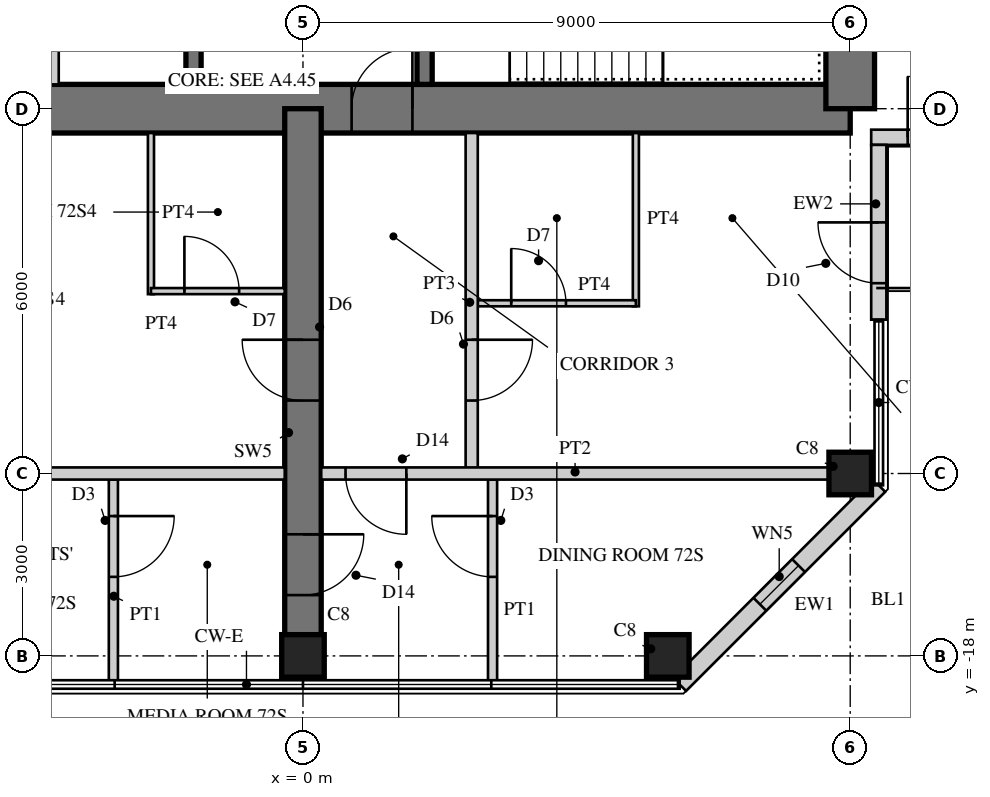
"""IFC4 building model, lengths in metres.
Left out: names, types, materials, properties, quantities, classifications, styles, units other than length and angle.
Written with IfcOpenShell. Run it as: python <this file> out.ifc"""

import sys

from ifc_helpers import new_model, si_unit, direction, frame, frame_2d, origin, origin_2d, place, context, subcontext, project, spatial, rectangle, hollow_rectangle, extrude, element, fill, save


model = new_model("IFC4")
c1 = context("Model", 3, precision=1e-05, world=origin(), true_north=direction((0.0, 1.0)))
c2 = subcontext(c1, "Body", "Model", "MODEL_VIEW")
j1 = project(units=[si_unit("LENGTHUNIT", "METRE"), si_unit("PLANEANGLEUNIT", "RADIAN")], contexts=[c1])
p1 = place(None, origin())
s1 = spatial("IfcSite", under=j1, at=p1, CompositionType="ELEMENT")
p2 = place(p1, origin())
s2 = spatial("IfcBuilding", under=s1, at=p2, CompositionType="ELEMENT")
p3 = place(p2, frame((0.0, 0.0, 278.1)))
s3 = spatial("IfcBuildingStorey", under=s2, at=p3, CompositionType="ELEMENT", Elevation=278.1)
p4 = place(p3, frame((-9.0, -9.0, 0.0), z_axis=(0.0, 0.0, 1.0), x_axis=(1.0, 0.0, 0.0)))
e1 = element("IfcWall", 1, at=p4, inside=s3, PredefinedType="SHEAR", context=c2, shape_type="SweptSolid", body=[
    extrude(rectangle(XDim=18.0, YDim=0.8, at=frame_2d((9.0, 0.0))), origin(), (0.0, 0.0, 1.0), 3.4),
])
p5 = place(p4, frame((9.8, 0.0, 0.0)))
e2 = element("IfcOpeningElement", 2, at=p5, cuts=e1, PredefinedType="OPENING", context=c2, shape_type="SweptSolid", body=[
    extrude(rectangle(XDim=1.0, YDim=2.4, at=frame_2d((0.5, 1.2))), frame((0.0, 0.41, 0.0), z_axis=(0.0, -1.0, 0.0), x_axis=(1.0, 0.0, 0.0)), (0.0, 0.0, 1.0), 0.82),
])
p6 = place(p3, frame((9.0, -9.0, 0.0), z_axis=(0.0, 0.0, 1.0), x_axis=(0.0, 1.0, 0.0)))
e3 = element("IfcWall", 3, at=p6, inside=s3, PredefinedType="SHEAR", context=c2, shape_type="SweptSolid", body=[
    extrude(rectangle(XDim=18.0, YDim=0.8, at=frame_2d((9.0, 0.0))), origin(), (0.0, 0.0, 1.0), 3.4),
])
p7 = place(p6, frame((9.8, 0.0, 0.0)))
e4 = element("IfcOpeningElement", 4, at=p7, cuts=e3, PredefinedType="OPENING", context=c2, shape_type="SweptSolid", body=[
    extrude(rectangle(XDim=1.0, YDim=2.4, at=frame_2d((0.5, 1.2))), frame((0.0, 0.41, 0.0), z_axis=(0.0, -1.0, 0.0), x_axis=(1.0, 0.0, 0.0)), (0.0, 0.0, 1.0), 0.82),
])
p8 = place(p3, frame((-1.8, -1.875, 0.0), z_axis=(0.0, 0.0, 1.0), x_axis=(0.0, -1.0, 0.0)))
e5 = element("IfcWall", 5, at=p8, inside=s3, PredefinedType="SHEAR", context=c2, shape_type="SweptSolid", body=[
    extrude(rectangle(XDim=6.725, YDim=0.25, at=frame_2d((3.363, 0.0))), origin(), (0.0, 0.0, 1.0), 3.4),
])
p9 = place(p8, frame((1.875, 0.0, 0.0)))
e6 = element("IfcOpeningElement", 6, at=p9, cuts=e5, PredefinedType="OPENING", context=c2, shape_type="SweptSolid", body=[
    extrude(rectangle(XDim=1.6, YDim=2.4, at=frame_2d((0.8, 1.2))), frame((0.0, 0.135, 0.0), z_axis=(0.0, -1.0, 0.0), x_axis=(1.0, 0.0, 0.0)), (0.0, 0.0, 1.0), 0.27),
])
p10 = place(p3, frame((-4.117, -5.975, 0.0), z_axis=(0.0, 0.0, 1.0), x_axis=(0.0, -1.0, 0.0)))
e7 = element("IfcWall", 7, at=p10, inside=s3, PredefinedType="PARTITIONING", context=c2, shape_type="SweptSolid", body=[
    extrude(rectangle(XDim=2.625, YDim=0.2, at=frame_2d((1.312, 0.0))), origin(), (0.0, 0.0, 1.0), 3.4),
])
p11 = place(p3, frame((2.0, -1.675, 0.0), z_axis=(0.0, 0.0, 1.0), x_axis=(0.0, -1.0, 0.0)))
e8 = element("IfcWall", 8, at=p11, inside=s3, PredefinedType="SHEAR", context=c2, shape_type="SweptSolid", body=[
    extrude(rectangle(XDim=6.925, YDim=0.25, at=frame_2d((3.462, 0.0))), origin(), (0.0, 0.0, 1.0), 3.4),
])
p12 = place(p11, frame((0.725, 0.0, 0.0)))
e9 = element("IfcOpeningElement", 9, at=p12, cuts=e8, PredefinedType="OPENING", context=c2, shape_type="SweptSolid", body=[
    extrude(rectangle(XDim=1.0, YDim=2.1, at=frame_2d((0.5, 1.05))), frame((0.0, 0.135, 0.0), z_axis=(0.0, -1.0, 0.0), x_axis=(1.0, 0.0, 0.0)), (0.0, 0.0, 1.0), 0.27),
])
p13 = place(p3, frame((0.0, -9.0, 0.0), z_axis=(0.0, 0.0, 1.0), x_axis=(0.0, -1.0, 0.0)))
e10 = element("IfcWall", 10, at=p13, inside=s3, PredefinedType="SHEAR", context=c2, shape_type="SweptSolid", body=[
    extrude(rectangle(XDim=9.0, YDim=0.6, at=frame_2d((4.5, 0.0))), origin(), (0.0, 0.0, 1.0), 3.4),
])
p14 = place(p13, frame((3.8, 0.0, 0.0)))
e11 = element("IfcOpeningElement", 11, at=p14, cuts=e10, PredefinedType="OPENING", context=c2, shape_type="SweptSolid", body=[
    extrude(rectangle(XDim=1.0, YDim=2.15, at=frame_2d((0.5, 1.075))), frame((0.0, 0.31, 0.0), z_axis=(0.0, -1.0, 0.0), x_axis=(1.0, 0.0, 0.0)), (0.0, 0.0, 1.0), 0.62),
])
p15 = place(p13, frame((7.0, 0.0, 0.0)))
e12 = element("IfcOpeningElement", 12, at=p15, cuts=e10, PredefinedType="OPENING", context=c2, shape_type="SweptSolid", body=[
    extrude(rectangle(XDim=1.0, YDim=2.2, at=frame_2d((0.5, 1.1))), frame((0.0, 0.31, 0.0), z_axis=(0.0, -1.0, 0.0), x_axis=(1.0, 0.0, 0.0)), (0.0, 0.0, 1.0), 0.62),
])
for number, where, z_axis, x_axis in (
    (13, (9.0, -15.0, 0.0), (0.0, 0.0, 1.0), (1.0, 0.0, 0.0)),
    (14, (0.0, -18.0, 0.0), (0.0, 0.0, 1.0), (1.0, 0.0, 0.0)),
    (15, (6.0, -18.0, 0.0), (0.0, 0.0, 1.0), (1.0, 0.0, 0.0)),
):
    element("IfcColumn", number, at=place(p3, frame(where, z_axis=z_axis, x_axis=x_axis)), inside=s3, PredefinedType="COLUMN", context=c2, shape_type="SweptSolid", body=[
        extrude(rectangle(XDim=0.7, YDim=0.7, at=origin_2d()), origin(), (0.0, 0.0, 1.0), 3.4),
    ])
p16 = place(p3, frame((9.345, -9.47, 0.0), z_axis=(0.0, 0.0, 1.0), x_axis=(1.0, 0.0, 0.0)))
e16 = element("IfcWall", 16, at=p16, inside=s3, PredefinedType="SOLIDWALL", context=c2, shape_type="SweptSolid", body=[
    extrude(rectangle(XDim=3.125, YDim=0.25, at=frame_2d((1.562, 0.0))), origin(), (0.0, 0.0, 1.0), 3.22),
])
p17 = place(p16, frame((0.6, 0.0, 0.0)))
e17 = element("IfcOpeningElement", 17, at=p17, cuts=e16, PredefinedType="OPENING", context=c2, shape_type="SweptSolid", body=[
    extrude(rectangle(XDim=1.0, YDim=2.2, at=frame_2d((0.5, 1.1))), frame((0.0, 0.135, 0.0), z_axis=(0.0, -1.0, 0.0), x_axis=(1.0, 0.0, 0.0)), (0.0, 0.0, 1.0), 0.27),
])
p18 = place(p3, frame((6.195, -18.47, 0.0), z_axis=(0.0, 0.0, 1.0), x_axis=(0.707106781187, 0.707106781187, 0.0)))
e18 = element("IfcWall", 18, at=p18, inside=s3, PredefinedType="SOLIDWALL", context=c2, shape_type="SweptSolid", body=[
    extrude(rectangle(XDim=4.632, YDim=0.3, at=frame_2d((2.316, 0.0))), origin(), (0.0, 0.0, 1.0), 3.22),
])
p19 = place(p18, frame((1.866, 0.0, 0.3)))
e19 = element("IfcOpeningElement", 19, at=p19, cuts=e18, PredefinedType="OPENING", context=c2, shape_type="SweptSolid", body=[
    extrude(rectangle(XDim=0.9, YDim=2.4, at=frame_2d((0.45, 1.2))), frame((0.0, 0.16, 0.0), z_axis=(0.0, -1.0, 0.0), x_axis=(1.0, 0.0, 0.0)), (0.0, 0.0, 1.0), 0.32),
])
p20 = place(p3, frame((9.47, -12.47, 0.0), z_axis=(0.0, 0.0, 1.0), x_axis=(0.0, 1.0, 0.0)))
e20 = element("IfcWall", 20, at=p20, inside=s3, PredefinedType="SOLIDWALL", context=c2, shape_type="SweptSolid", body=[
    extrude(rectangle(XDim=2.875, YDim=0.25, at=frame_2d((1.438, 0.0))), origin(), (0.0, 0.0, 1.0), 3.22),
])
p21 = place(p20, frame((0.6, 0.0, 0.0)))
e21 = element("IfcOpeningElement", 21, at=p21, cuts=e20, PredefinedType="OPENING", context=c2, shape_type="SweptSolid", body=[
    extrude(rectangle(XDim=1.0, YDim=2.2, at=frame_2d((0.5, 1.1))), frame((0.0, 0.135, 0.0), z_axis=(0.0, -1.0, 0.0), x_axis=(1.0, 0.0, 0.0)), (0.0, 0.0, 1.0), 0.27),
])
p22 = place(p3, frame((5.475, -9.4, 0.0), z_axis=(0.0, 0.0, 1.0), x_axis=(0.0, -1.0, 0.0)))
e22 = element("IfcWall", 22, at=p22, inside=s3, PredefinedType="PARTITIONING", context=c2, shape_type="SweptSolid", body=[
    extrude(rectangle(XDim=2.85, YDim=0.1, at=frame_2d((1.425, 0.0))), origin(), (0.0, 0.0, 1.0), 3.22),
])
p23 = place(p3, frame((2.875, -12.2, 0.0), z_axis=(0.0, 0.0, 1.0), x_axis=(1.0, 0.0, 0.0)))
e23 = element("IfcWall", 23, at=p23, inside=s3, PredefinedType="PARTITIONING", context=c2, shape_type="SweptSolid", body=[
    extrude(rectangle(XDim=2.6, YDim=0.1, at=frame_2d((1.3, 0.0))), origin(), (0.0, 0.0, 1.0), 3.22),
])
p24 = place(p23, frame((0.55, 0.0, 0.0)))
e24 = element("IfcOpeningElement", 24, at=p24, cuts=e23, PredefinedType="OPENING", context=c2, shape_type="SweptSolid", body=[
    extrude(rectangle(XDim=0.9, YDim=2.1, at=frame_2d((0.45, 1.05))), frame((0.0, 0.06, 0.0), z_axis=(0.0, -1.0, 0.0), x_axis=(1.0, 0.0, 0.0)), (0.0, 0.0, 1.0), 0.12),
])
p25 = place(p3, frame((-2.5, -9.4, 0.0), z_axis=(0.0, 0.0, 1.0), x_axis=(0.0, -1.0, 0.0)))
e25 = element("IfcWall", 25, at=p25, inside=s3, PredefinedType="PARTITIONING", context=c2, shape_type="SweptSolid", body=[
    extrude(rectangle(XDim=2.65, YDim=0.1, at=frame_2d((1.325, 0.0))), origin(), (0.0, 0.0, 1.0), 3.22),
])
p26 = place(p3, frame((-2.5, -12.0, 0.0), z_axis=(0.0, 0.0, 1.0), x_axis=(1.0, 0.0, 0.0)))
e26 = element("IfcWall", 26, at=p26, inside=s3, PredefinedType="PARTITIONING", context=c2, shape_type="SweptSolid", body=[
    extrude(rectangle(XDim=2.2, YDim=0.1, at=frame_2d((1.1, 0.0))), origin(), (0.0, 0.0, 1.0), 3.22),
])
p27 = place(p26, frame((0.55, 0.0, 0.0)))
e27 = element("IfcOpeningElement", 27, at=p27, cuts=e26, PredefinedType="OPENING", context=c2, shape_type="SweptSolid", body=[
    extrude(rectangle(XDim=0.9, YDim=2.1, at=frame_2d((0.45, 1.05))), frame((0.0, 0.06, 0.0), z_axis=(0.0, -1.0, 0.0), x_axis=(1.0, 0.0, 0.0)), (0.0, 0.0, 1.0), 0.12),
])
p28 = place(p3, frame((2.775, -9.4, 0.0), z_axis=(0.0, 0.0, 1.0), x_axis=(0.0, -1.0, 0.0)))
e28 = element("IfcWall", 28, at=p28, inside=s3, PredefinedType="SOLIDWALL", context=c2, shape_type="SweptSolid", body=[
    extrude(rectangle(XDim=5.6, YDim=0.2, at=frame_2d((2.8, 0.0))), origin(), (0.0, 0.0, 1.0), 3.22),
])
p29 = place(p28, frame((3.4, 0.0, 0.0)))
e29 = element("IfcOpeningElement", 29, at=p29, cuts=e28, PredefinedType="OPENING", context=c2, shape_type="SweptSolid", body=[
    extrude(rectangle(XDim=1.0, YDim=2.15, at=frame_2d((0.5, 1.075))), frame((0.0, 0.11, 0.0), z_axis=(0.0, -1.0, 0.0), x_axis=(1.0, 0.0, 0.0)), (0.0, 0.0, 1.0), 0.22),
])
p30 = place(p3, frame((3.118, -15.1, 0.0), z_axis=(0.0, 0.0, 1.0), x_axis=(0.0, -1.0, 0.0)))
e30 = element("IfcWall", 30, at=p30, inside=s3, PredefinedType="PARTITIONING", context=c2, shape_type="SweptSolid", body=[
    extrude(rectangle(XDim=3.33, YDim=0.15, at=frame_2d((1.665, 0.0))), origin(), (0.0, 0.0, 1.0), 3.22),
])
p31 = place(p30, frame((0.6, 0.0, 0.0)))
e31 = element("IfcOpeningElement", 31, at=p31, cuts=e30, PredefinedType="OPENING", context=c2, shape_type="SweptSolid", body=[
    extrude(rectangle(XDim=1.0, YDim=2.1, at=frame_2d((0.5, 1.05))), frame((0.0, 0.085, 0.0), z_axis=(0.0, -1.0, 0.0), x_axis=(1.0, 0.0, 0.0)), (0.0, 0.0, 1.0), 0.17),
])
p32 = place(p3, frame((-3.118, -15.1, 0.0), z_axis=(0.0, 0.0, 1.0), x_axis=(0.0, -1.0, 0.0)))
e32 = element("IfcWall", 32, at=p32, inside=s3, PredefinedType="PARTITIONING", context=c2, shape_type="SweptSolid", body=[
    extrude(rectangle(XDim=3.33, YDim=0.15, at=frame_2d((1.665, 0.0))), origin(), (0.0, 0.0, 1.0), 3.22),
])
p33 = place(p32, frame((0.6, 0.0, 0.0)))
e33 = element("IfcOpeningElement", 33, at=p33, cuts=e32, PredefinedType="OPENING", context=c2, shape_type="SweptSolid", body=[
    extrude(rectangle(XDim=1.0, YDim=2.1, at=frame_2d((0.5, 1.05))), frame((0.0, 0.085, 0.0), z_axis=(0.0, -1.0, 0.0), x_axis=(1.0, 0.0, 0.0)), (0.0, 0.0, 1.0), 0.17),
])
p34 = place(p3, frame((-8.65, -15.0, 0.0), z_axis=(0.0, 0.0, 1.0), x_axis=(1.0, 0.0, 0.0)))
e34 = element("IfcWall", 34, at=p34, inside=s3, PredefinedType="SOLIDWALL", context=c2, shape_type="SweptSolid", body=[
    extrude(rectangle(XDim=8.35, YDim=0.2, at=frame_2d((4.175, 0.0))), origin(), (0.0, 0.0, 1.0), 2.52),
])
p35 = place(p3, frame((0.3, -15.0, 0.0), z_axis=(0.0, 0.0, 1.0), x_axis=(1.0, 0.0, 0.0)))
e35 = element("IfcWall", 35, at=p35, inside=s3, PredefinedType="SOLIDWALL", context=c2, shape_type="SweptSolid", body=[
    extrude(rectangle(XDim=8.35, YDim=0.2, at=frame_2d((4.175, 0.0))), origin(), (0.0, 0.0, 1.0), 2.52),
])
p36 = place(p35, frame((0.4, 0.0, 0.0)))
e36 = element("IfcOpeningElement", 36, at=p36, cuts=e35, PredefinedType="OPENING", context=c2, shape_type="SweptSolid", body=[
    extrude(rectangle(XDim=1.0, YDim=2.2, at=frame_2d((0.5, 1.1))), frame((0.0, 0.11, 0.0), z_axis=(0.0, -1.0, 0.0), x_axis=(1.0, 0.0, 0.0)), (0.0, 0.0, 1.0), 0.22),
])
p37 = place(p17, origin())
e37 = element("IfcDoor", 37, at=p37, inside=s3, OperationType="SINGLE_SWING_LEFT", PredefinedType="DOOR", context=c2, shape_type="SweptSolid", body=[
    extrude(hollow_rectangle(XDim=1.0, YDim=2.2, WallThickness=0.06, at=frame_2d((0.5, 1.1))), frame((0.0, 0.025, 0.0), z_axis=(0.0, -1.0, 0.0), x_axis=(1.0, 0.0, 0.0)), (0.0, 0.0, 1.0), 0.05),
    extrude(rectangle(XDim=0.879, YDim=2.079, at=frame_2d((0.5, 1.1))), frame((0.0, 0.025, 0.0), z_axis=(0.0, -1.0, 0.0), x_axis=(1.0, 0.0, 0.0)), (0.0, 0.0, 1.0), 0.05),
])
fill(e17, e37)
p38 = place(p19, origin())
e38 = element("IfcWindow", 38, at=p38, inside=s3, PartitioningType="SINGLE_PANEL", PredefinedType="WINDOW", context=c2, shape_type="SweptSolid", body=[
    extrude(hollow_rectangle(XDim=0.9, YDim=2.4, WallThickness=0.06, at=frame_2d((0.45, 1.2))), frame((0.0, 0.03, 0.0), z_axis=(0.0, -1.0, 0.0), x_axis=(1.0, 0.0, 0.0)), (0.0, 0.0, 1.0), 0.06),
    extrude(rectangle(XDim=0.779, YDim=2.279, at=frame_2d((0.45, 1.2))), frame((0.0, 0.03, 0.0), z_axis=(0.0, -1.0, 0.0), x_axis=(1.0, 0.0, 0.0)), (0.0, 0.0, 1.0), 0.06),
])
fill(e19, e38)
p39 = place(p21, origin())
e39 = element("IfcDoor", 39, at=p39, inside=s3, OperationType="SINGLE_SWING_RIGHT", PredefinedType="DOOR", context=c2, shape_type="SweptSolid", body=[
    extrude(hollow_rectangle(XDim=1.0, YDim=2.2, WallThickness=0.06, at=frame_2d((0.5, 1.1))), frame((0.0, 0.025, 0.0), z_axis=(0.0, -1.0, 0.0), x_axis=(1.0, 0.0, 0.0)), (0.0, 0.0, 1.0), 0.05),
    extrude(rectangle(XDim=0.879, YDim=2.079, at=frame_2d((0.5, 1.1))), frame((0.0, 0.025, 0.0), z_axis=(0.0, -1.0, 0.0), x_axis=(1.0, 0.0, 0.0)), (0.0, 0.0, 1.0), 0.05),
])
fill(e21, e39)
p40 = place(p24, origin())
e40 = element("IfcDoor", 40, at=p40, inside=s3, OperationType="SINGLE_SWING_LEFT", PredefinedType="DOOR", context=c2, shape_type="SweptSolid", body=[
    extrude(rectangle(XDim=0.9, YDim=2.1, at=frame_2d((0.45, 1.05))), frame((0.0, 0.025, 0.0), z_axis=(0.0, -1.0, 0.0), x_axis=(1.0, 0.0, 0.0)), (0.0, 0.0, 1.0), 0.05),
])
fill(e24, e40)
p41 = place(p27, origin())
e41 = element("IfcDoor", 41, at=p41, inside=s3, OperationType="SINGLE_SWING_LEFT", PredefinedType="DOOR", context=c2, shape_type="SweptSolid", body=[
    extrude(rectangle(XDim=0.9, YDim=2.1, at=frame_2d((0.45, 1.05))), frame((0.0, 0.025, 0.0), z_axis=(0.0, -1.0, 0.0), x_axis=(1.0, 0.0, 0.0)), (0.0, 0.0, 1.0), 0.05),
])
fill(e27, e41)
p42 = place(p29, origin())
e42 = element("IfcDoor", 42, at=p42, inside=s3, OperationType="SINGLE_SWING_LEFT", PredefinedType="DOOR", context=c2, shape_type="SweptSolid", body=[
    extrude(rectangle(XDim=1.0, YDim=2.15, at=frame_2d((0.5, 1.075))), frame((0.0, 0.025, 0.0), z_axis=(0.0, -1.0, 0.0), x_axis=(1.0, 0.0, 0.0)), (0.0, 0.0, 1.0), 0.05),
])
fill(e29, e42)
p43 = place(p31, frame((1.0, 0.0, 0.0), z_axis=(0.0, 0.0, 1.0), x_axis=(-1.0, 0.0, 0.0)))
e43 = element("IfcDoor", 43, at=p43, inside=s3, OperationType="SINGLE_SWING_RIGHT", PredefinedType="DOOR", context=c2, shape_type="SweptSolid", body=[
    extrude(rectangle(XDim=1.0, YDim=2.1, at=frame_2d((0.5, 1.05))), frame((0.0, 0.025, 0.0), z_axis=(0.0, -1.0, 0.0), x_axis=(1.0, 0.0, 0.0)), (0.0, 0.0, 1.0), 0.05),
])
fill(e31, e43)
p44 = place(p33, origin())
e44 = element("IfcDoor", 44, at=p44, inside=s3, OperationType="SINGLE_SWING_LEFT", PredefinedType="DOOR", context=c2, shape_type="SweptSolid", body=[
    extrude(rectangle(XDim=1.0, YDim=2.1, at=frame_2d((0.5, 1.05))), frame((0.0, 0.025, 0.0), z_axis=(0.0, -1.0, 0.0), x_axis=(1.0, 0.0, 0.0)), (0.0, 0.0, 1.0), 0.05),
])
fill(e33, e44)
p45 = place(p36, frame((1.0, 0.0, 0.0), z_axis=(0.0, 0.0, 1.0), x_axis=(-1.0, 0.0, 0.0)))
e45 = element("IfcDoor", 45, at=p45, inside=s3, OperationType="SINGLE_SWING_LEFT", PredefinedType="DOOR", context=c2, shape_type="SweptSolid", body=[
    extrude(rectangle(XDim=1.0, YDim=2.2, at=frame_2d((0.5, 1.1))), frame((0.0, 0.025, 0.0), z_axis=(0.0, -1.0, 0.0), x_axis=(1.0, 0.0, 0.0)), (0.0, 0.0, 1.0), 0.05),
])
fill(e36, e45)
p46 = place(p14, frame((1.0, 0.0, 0.0), z_axis=(0.0, 0.0, 1.0), x_axis=(-1.0, 0.0, 0.0)))
e46 = element("IfcDoor", 46, at=p46, inside=s3, OperationType="SINGLE_SWING_RIGHT", PredefinedType="DOOR", context=c2, shape_type="SweptSolid", body=[
    extrude(rectangle(XDim=1.0, YDim=2.15, at=frame_2d((0.5, 1.075))), frame((0.0, 0.025, 0.0), z_axis=(0.0, -1.0, 0.0), x_axis=(1.0, 0.0, 0.0)), (0.0, 0.0, 1.0), 0.05),
])
fill(e11, e46)
p47 = place(p15, origin())
e47 = element("IfcDoor", 47, at=p47, inside=s3, OperationType="SINGLE_SWING_LEFT", PredefinedType="DOOR", context=c2, shape_type="SweptSolid", body=[
    extrude(rectangle(XDim=1.0, YDim=2.2, at=frame_2d((0.5, 1.1))), frame((0.0, 0.025, 0.0), z_axis=(0.0, -1.0, 0.0), x_axis=(1.0, 0.0, 0.0)), (0.0, 0.0, 1.0), 0.05),
])
fill(e12, e47)
p48 = place(p5, origin())
e48 = element("IfcDoor", 48, at=p48, inside=s3, OperationType="SINGLE_SWING_RIGHT", PredefinedType="DOOR", context=c2, shape_type="SweptSolid", body=[
    extrude(rectangle(XDim=1.0, YDim=2.4, at=frame_2d((0.5, 1.2))), frame((0.0, 0.055, 0.0), z_axis=(0.0, -1.0, 0.0), x_axis=(1.0, 0.0, 0.0)), (0.0, 0.0, 1.0), 0.05),
])
fill(e2, e48)
save(model, sys.argv[1])
